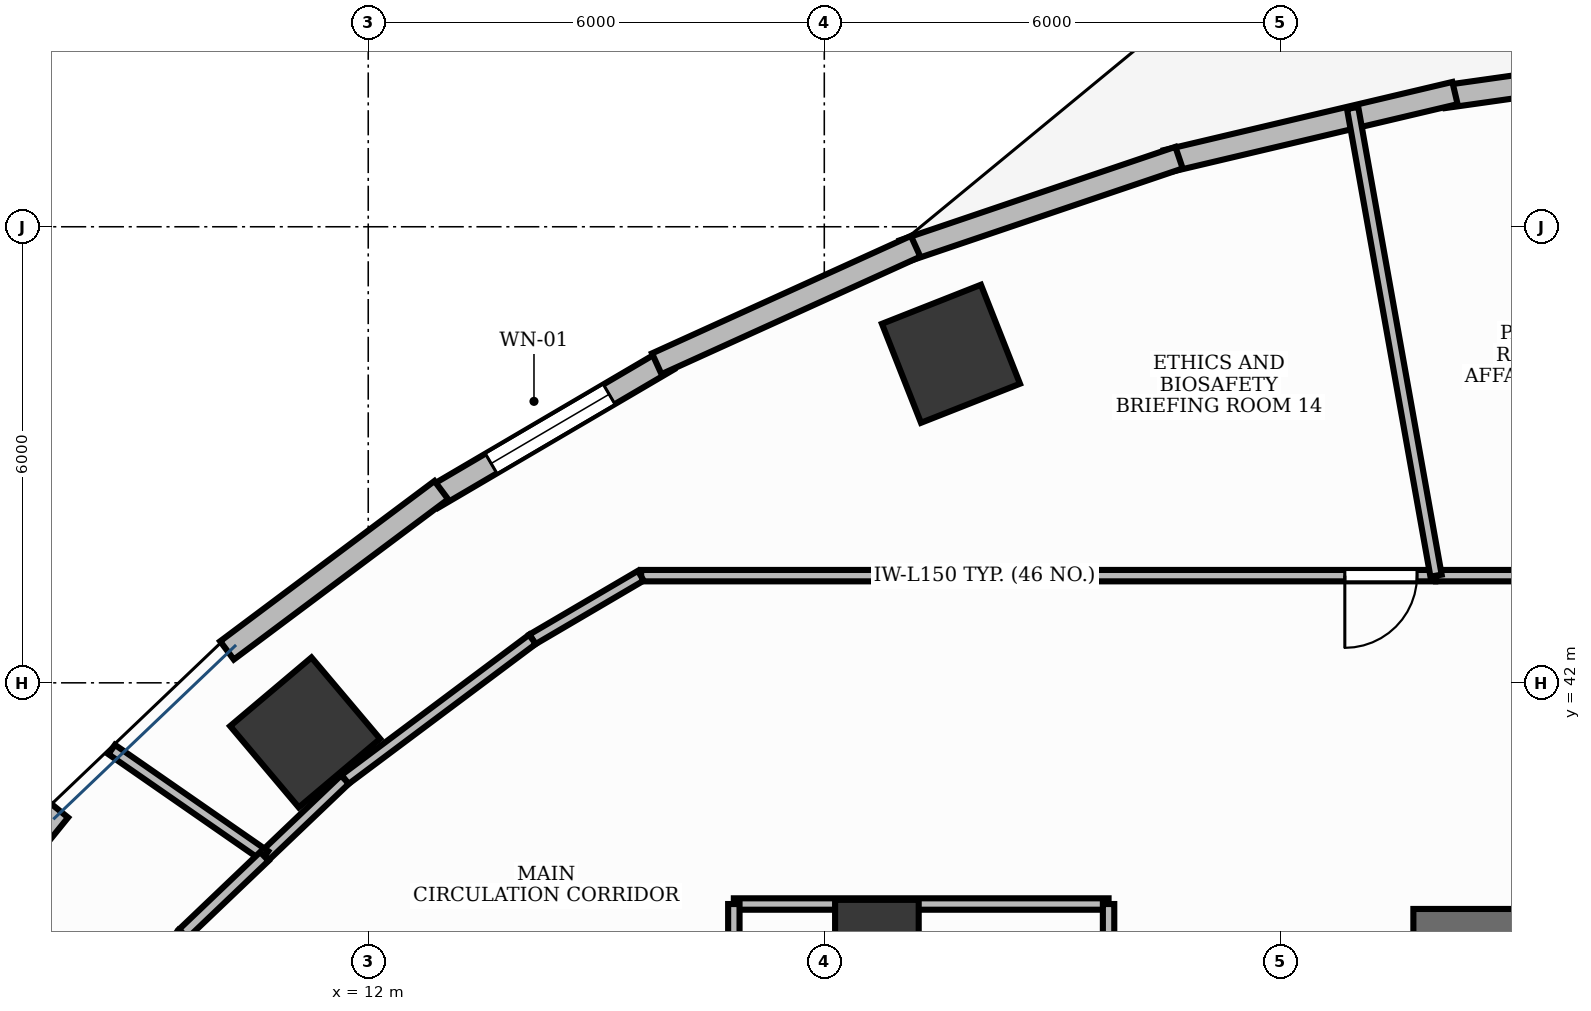
"""IFC4 building model, lengths in metres.
Left out: names, types, materials, properties, quantities, classifications, styles, units other than length and angle.
Written with IfcOpenShell. Run it as: python <this file> out.ifc"""

import sys

from ifc_helpers import new_model, si_unit, direction, frame, frame_2d, origin, origin_2d, place, context, subcontext, project, spatial, rectangle, extrude, element, fill, save


model = new_model("IFC4")
c1 = context("Model", 3, precision=1e-05, world=origin(), true_north=direction((0.0, 1.0)))
c2 = subcontext(c1, "Body", "Model", "MODEL_VIEW")
j1 = project(units=[si_unit("LENGTHUNIT", "METRE"), si_unit("PLANEANGLEUNIT", "RADIAN")], contexts=[c1])
p1 = place(None, origin())
s1 = spatial("IfcSite", under=j1, at=p1, CompositionType="ELEMENT")
p2 = place(p1, origin())
s2 = spatial("IfcBuilding", under=s1, at=p2, CompositionType="ELEMENT")
p3 = place(p2, frame((0.0, 0.0, 34.2)))
s3 = spatial("IfcBuildingStorey", under=s2, at=p3, CompositionType="ELEMENT", Elevation=34.2)
p4 = place(p3, frame((25.75, 38.8, 0.0), z_axis=(0.0, 0.0, 1.0), x_axis=(1.0, 0.0, 0.0)))
e1 = element("IfcWall", 1, at=p4, inside=s3, PredefinedType="SHEAR", context=c2, shape_type="SweptSolid", body=[
    extrude(rectangle(XDim=3.1, YDim=0.45, at=frame_2d((1.55, 0.0))), origin(), (0.0, 0.0, 1.0), 3.9),
])
for number, where, z_axis, x_axis in (
    (2, (19.667, 46.329, -0.0), (0.0, 0.0, 1.0), (0.93, 0.367, 0.0)),
    (3, (11.17, 41.347, -0.0), (0.0, 0.0, 1.0), (0.764, 0.645, 0.0)),
):
    element("IfcColumn", number, at=place(p3, frame(where, z_axis=z_axis, x_axis=x_axis)), inside=s3, PredefinedType="COLUMN", context=c2, shape_type="SweptSolid", body=[
        extrude(rectangle(XDim=1.4, YDim=1.4, at=origin_2d()), origin(), (0.0, 0.0, 1.0), 3.901),
    ])
p5 = place(p3, frame((18.692, 38.595, -0.0), z_axis=(0.0, 0.0, 1.0), x_axis=(1.0, 0.0, 0.0)))
e4 = element("IfcColumn", 4, at=p5, inside=s3, PredefinedType="COLUMN", context=c2, shape_type="SweptSolid", body=[
    extrude(rectangle(XDim=1.1, YDim=1.1, at=origin_2d()), origin(), (0.0, 0.0, 1.0), 3.901),
])
p6 = place(p3, frame((30.023, 50.257, 0.0), z_axis=(0.0, 0.0, 1.0), x_axis=(-0.990165573956, -0.139900450869, 0.0)))
e5 = element("IfcWall", 5, at=p6, inside=s3, PredefinedType="STANDARD", context=c2, shape_type="SweptSolid", body=[
    extrude(rectangle(XDim=3.911, YDim=0.3, at=frame_2d((1.956, 0.0))), origin(), (0.0, 0.0, 1.0), 3.9),
])
p7 = place(p6, frame((1.406, 0.0, 0.0)))
e6 = element("IfcOpeningElement", 6, at=p7, cuts=e5, PredefinedType="OPENING", context=c2, shape_type="SweptSolid", body=[
    extrude(rectangle(XDim=1.1, YDim=2.15, at=frame_2d((0.55, 1.075))), frame((0.0, 0.165, 0.0), z_axis=(0.0, -1.0, 0.0), x_axis=(1.0, 0.0, 0.0)), (0.0, 0.0, 1.0), 0.33),
])
p8 = place(p3, frame((15.944, 46.25, 0.0), z_axis=(0.0, 0.0, 1.0), x_axis=(-0.862473134325, -0.506102847817, 0.0)))
e7 = element("IfcWall", 7, at=p8, inside=s3, PredefinedType="STANDARD", context=c2, shape_type="SweptSolid", body=[
    extrude(rectangle(XDim=3.595, YDim=0.3, at=frame_2d((1.798, 0.0))), origin(), (0.0, 0.0, 1.0), 3.9),
])
p9 = place(p8, frame((0.898, 0.0, 0.9)))
e8 = element("IfcOpeningElement", 8, at=p9, cuts=e7, PredefinedType="OPENING", context=c2, shape_type="SweptSolid", body=[
    extrude(rectangle(XDim=1.8, YDim=2.1, at=frame_2d((0.9, 1.05))), frame((0.0, 0.165, 0.0), z_axis=(0.0, -1.0, 0.0), x_axis=(1.0, 0.0, 0.0)), (0.0, 0.0, 1.0), 0.33),
])
p10 = place(p3, frame((26.297, 49.759, 0.0), z_axis=(0.0, 0.0, 1.0), x_axis=(-0.973197600754, -0.229970497863, 0.0)))
e9 = element("IfcWall", 9, at=p10, inside=s3, PredefinedType="STANDARD", context=c2, shape_type="SweptSolid", body=[
    extrude(rectangle(XDim=3.901, YDim=0.3, at=frame_2d((1.951, 0.0))), origin(), (0.0, 0.0, 1.0), 3.9),
])
p11 = place(p3, frame((22.667, 48.909, 0.0), z_axis=(0.0, 0.0, 1.0), x_axis=(-0.94702579403, -0.321157508773, 0.0)))
e10 = element("IfcWall", 10, at=p11, inside=s3, PredefinedType="STANDARD", context=c2, shape_type="SweptSolid", body=[
    extrude(rectangle(XDim=3.83, YDim=0.3, at=frame_2d((1.915, 0.0))), origin(), (0.0, 0.0, 1.0), 3.9),
])
p12 = place(p3, frame((19.201, 47.743, 0.0), z_axis=(0.0, 0.0, 1.0), x_axis=(-0.910623406862, -0.413237233166, 0.0)))
e11 = element("IfcWall", 11, at=p12, inside=s3, PredefinedType="STANDARD", context=c2, shape_type="SweptSolid", body=[
    extrude(rectangle(XDim=3.74, YDim=0.3, at=frame_2d((1.87, 0.0))), origin(), (0.0, 0.0, 1.0), 3.47),
])
p13 = place(p3, frame((12.961, 44.535, 0.0), z_axis=(0.0, 0.0, 1.0), x_axis=(-0.800823020995, -0.598901067827, 0.0)))
e12 = element("IfcWall", 12, at=p13, inside=s3, PredefinedType="STANDARD", context=c2, shape_type="SweptSolid", body=[
    extrude(rectangle(XDim=3.521, YDim=0.3, at=frame_2d((1.76, 0.0))), origin(), (0.0, 0.0, 1.0), 3.47),
])
p14 = place(p3, frame((7.934, 40.323, 0.0), z_axis=(0.0, 0.0, 1.0), x_axis=(-0.629221727718, -0.777225847079, 0.0)))
e13 = element("IfcWall", 13, at=p14, inside=s3, PredefinedType="STANDARD", context=c2, shape_type="SweptSolid", body=[
    extrude(rectangle(XDim=3.288, YDim=0.3, at=frame_2d((1.644, 0.0))), origin(), (0.0, 0.0, 1.0), 3.9),
])
p15 = place(p3, frame((29.826, 43.41, 0.0), z_axis=(0.0, 0.0, 1.0), x_axis=(-1.0, 0.0, 0.0)))
e14 = element("IfcWall", 14, at=p15, inside=s3, PredefinedType="PARTITIONING", context=c2, shape_type="SweptSolid", body=[
    extrude(rectangle(XDim=3.777, YDim=0.15, at=frame_2d((1.889, 0.0))), origin(), (0.0, 0.0, 1.0), 2.91),
])
p16 = place(p15, frame((0.24, 0.0, 0.0)))
e15 = element("IfcOpeningElement", 15, at=p16, cuts=e14, PredefinedType="OPENING", context=c2, shape_type="SweptSolid", body=[
    extrude(rectangle(XDim=0.95, YDim=2.15, at=frame_2d((0.475, 1.075))), frame((0.0, 0.09, 0.0), z_axis=(0.0, -1.0, 0.0), x_axis=(1.0, 0.0, 0.0)), (0.0, 0.0, 1.0), 0.18),
])
p17 = place(p3, frame((26.038, 43.41, 0.0), z_axis=(0.0, 0.0, 1.0), x_axis=(-1.0, 0.0, 0.0)))
e16 = element("IfcWall", 16, at=p17, inside=s3, PredefinedType="PARTITIONING", context=c2, shape_type="SweptSolid", body=[
    extrude(rectangle(XDim=10.447, YDim=0.15, at=frame_2d((5.224, 0.0))), origin(), (0.0, 0.0, 1.0), 2.91),
])
p18 = place(p17, frame((0.24, 0.0, 0.0)))
e17 = element("IfcOpeningElement", 17, at=p18, cuts=e16, PredefinedType="OPENING", context=c2, shape_type="SweptSolid", body=[
    extrude(rectangle(XDim=0.95, YDim=2.15, at=frame_2d((0.475, 1.075))), frame((0.0, 0.09, 0.0), z_axis=(0.0, -1.0, 0.0), x_axis=(1.0, 0.0, 0.0)), (0.0, 0.0, 1.0), 0.18),
])
p19 = place(p3, frame((26.048, 43.41, 0.0), z_axis=(0.0, 0.0, 1.0), x_axis=(-0.175605435055, 0.984460629573, 0.0)))
e18 = element("IfcWall", 18, at=p19, inside=s3, PredefinedType="PARTITIONING", context=c2, shape_type="SweptSolid", body=[
    extrude(rectangle(XDim=6.251, YDim=0.15, at=frame_2d((3.125, 0.0))), origin(), (0.0, 0.0, 1.0), 2.91),
])
p20 = place(p3, frame((15.586, 43.409, 0.0), z_axis=(0.0, 0.0, 1.0), x_axis=(-0.862446636904, -0.506148000582, 0.0)))
e19 = element("IfcWall", 19, at=p20, inside=s3, PredefinedType="PARTITIONING", context=c2, shape_type="SweptSolid", body=[
    extrude(rectangle(XDim=1.652, YDim=0.15, at=frame_2d((0.826, 0.0))), origin(), (0.0, 0.0, 1.0), 2.91),
])
p21 = place(p3, frame((14.16, 42.572, 0.0), z_axis=(0.0, 0.0, 1.0), x_axis=(-0.800808090092, -0.598921032227, 0.0)))
e20 = element("IfcWall", 20, at=p21, inside=s3, PredefinedType="PARTITIONING", context=c2, shape_type="SweptSolid", body=[
    extrude(rectangle(XDim=3.079, YDim=0.15, at=frame_2d((1.54, 0.0))), origin(), (0.0, 0.0, 1.0), 2.91),
])
p22 = place(p3, frame((11.693, 40.727, 0.0), z_axis=(0.0, 0.0, 1.0), x_axis=(-0.723614682185, -0.690204166697, 0.0)))
e21 = element("IfcWall", 21, at=p22, inside=s3, PredefinedType="PARTITIONING", context=c2, shape_type="SweptSolid", body=[
    extrude(rectangle(XDim=1.454, YDim=0.15, at=frame_2d((0.727, 0.0))), origin(), (0.0, 0.0, 1.0), 2.91),
])
p23 = place(p3, frame((10.641, 39.723, 0.0), z_axis=(0.0, 0.0, 1.0), x_axis=(-0.821561492386, 0.570119912149, 0.0)))
e22 = element("IfcWall", 22, at=p23, inside=s3, PredefinedType="PARTITIONING", context=c2, shape_type="SweptSolid", body=[
    extrude(rectangle(XDim=2.455, YDim=0.15, at=frame_2d((1.227, 0.0))), origin(), (0.0, 0.0, 1.0), 2.91),
])
p24 = place(p3, frame((16.81, 39.09, 0.0), z_axis=(0.0, 0.0, 1.0), x_axis=(1.0, 0.0, 0.0)))
e23 = element("IfcWall", 23, at=p24, inside=s3, PredefinedType="PARTITIONING", context=c2, shape_type="SweptSolid", body=[
    extrude(rectangle(XDim=4.93, YDim=0.15, at=frame_2d((2.465, 0.0))), origin(), (0.0, 0.0, 1.0), 2.91),
])
p25 = place(p3, frame((21.74, 39.09, 0.0), z_axis=(0.0, 0.0, 1.0), x_axis=(0.0, -1.0, 0.0)))
e24 = element("IfcWall", 24, at=p25, inside=s3, PredefinedType="PARTITIONING", context=c2, shape_type="SweptSolid", body=[
    extrude(rectangle(XDim=4.28, YDim=0.15, at=frame_2d((2.14, 0.0))), origin(), (0.0, 0.0, 1.0), 2.91),
])
p26 = place(p3, frame((16.81, 36.8, 0.0), z_axis=(0.0, 0.0, 1.0), x_axis=(0.0, 1.0, 0.0)))
e25 = element("IfcWall", 25, at=p26, inside=s3, PredefinedType="PARTITIONING", context=c2, shape_type="SweptSolid", body=[
    extrude(rectangle(XDim=2.29, YDim=0.15, at=frame_2d((1.145, 0.0))), origin(), (0.0, 0.0, 1.0), 2.91),
])
p27 = place(p3, frame((10.634, 39.717, 0.0), z_axis=(0.0, 0.0, 1.0), x_axis=(-0.723701031319, -0.690113626345, 0.0)))
e26 = element("IfcWall", 26, at=p27, inside=s3, PredefinedType="PARTITIONING", context=c2, shape_type="SweptSolid", body=[
    extrude(rectangle(XDim=1.476, YDim=0.16, at=frame_2d((0.738, 0.0))), origin(), (0.0, 0.0, 1.0), 2.91),
])
p28 = place(p3, frame((9.565, 38.697, 0.0), z_axis=(0.0, 0.0, 1.0), x_axis=(-0.629270515505, -0.777186347227, 0.0)))
e27 = element("IfcWall", 27, at=p28, inside=s3, PredefinedType="PARTITIONING", context=c2, shape_type="SweptSolid", body=[
    extrude(rectangle(XDim=2.817, YDim=0.16, at=frame_2d((1.409, 0.0))), origin(), (0.0, 0.0, 1.0), 2.91),
])
p29 = place(p9, origin())
e28 = element("IfcWindow", 28, at=p29, inside=s3, PartitioningType="SINGLE_PANEL", PredefinedType="WINDOW", context=c2, shape_type="SweptSolid", body=[
    extrude(rectangle(XDim=1.8, YDim=2.1, at=frame_2d((0.9, 1.05))), frame((0.0, 0.03, 0.0), z_axis=(0.0, -1.0, 0.0), x_axis=(1.0, 0.0, 0.0)), (0.0, 0.0, 1.0), 0.06),
])
fill(e8, e28)
p30 = place(p18, origin())
e29 = element("IfcDoor", 29, at=p30, inside=s3, OperationType="SINGLE_SWING_RIGHT", PredefinedType="DOOR", context=c2, shape_type="SweptSolid", body=[
    extrude(rectangle(XDim=0.95, YDim=2.15, at=frame_2d((0.475, 1.075))), frame((0.0, 0.025, 0.0), z_axis=(0.0, -1.0, 0.0), x_axis=(1.0, 0.0, 0.0)), (0.0, 0.0, 1.0), 0.05),
])
fill(e17, e29)
save(model, sys.argv[1])
